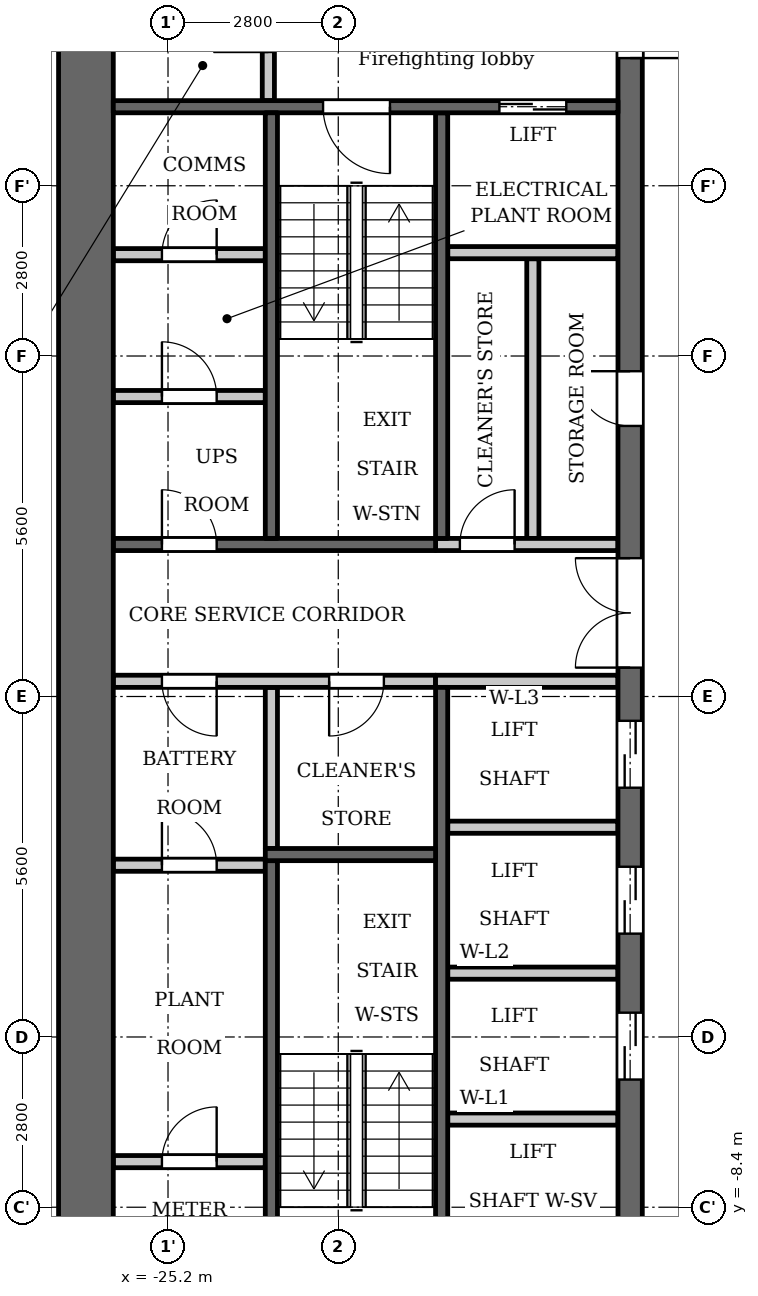
"""IFC4 building model, lengths in metres.
Left out: names, types, materials, properties, quantities, classifications, styles, units other than length and angle.
Written with IfcOpenShell. Run it as: python <this file> out.ifc"""

import sys

from ifc_helpers import new_model, si_unit, direction, frame, frame_2d, origin, place, context, subcontext, project, spatial, rectangle, extrude, element, fill, save


model = new_model("IFC4")
c1 = context("Model", 3, precision=1e-05, world=origin(), true_north=direction((0.0, 1.0)))
c2 = subcontext(c1, "Body", "Model", "MODEL_VIEW")
j1 = project(units=[si_unit("LENGTHUNIT", "METRE"), si_unit("PLANEANGLEUNIT", "RADIAN")], contexts=[c1])
p1 = place(None, origin())
s1 = spatial("IfcSite", under=j1, at=p1, CompositionType="ELEMENT")
p2 = place(p1, origin())
s2 = spatial("IfcBuilding", under=s1, at=p2, CompositionType="ELEMENT")
p3 = place(p2, frame((0.0, 0.0, 83.3)))
s3 = spatial("IfcBuildingStorey", under=s2, at=p3, CompositionType="ELEMENT", Elevation=83.3)
p4 = place(p3, frame((-23.5, -2.5, 0.0), z_axis=(0.0, 0.0, 1.0), x_axis=(0.0, 1.0, 0.0)))
e1 = element("IfcWall", 1, at=p4, inside=s3, PredefinedType="PARTITIONING", context=c2, shape_type="SweptSolid", body=[
    extrude(rectangle(XDim=2.65, YDim=0.2, at=frame_2d((1.325, 0.0))), origin(), (0.0, 0.0, 1.0), 3.2),
])
p5 = place(p3, frame((-20.7, 2.6, 0.0), z_axis=(0.0, 0.0, 1.0), x_axis=(0.0, 1.0, 0.0)))
e2 = element("IfcWall", 2, at=p5, inside=s3, PredefinedType="SHEAR", context=c2, shape_type="SweptSolid", body=[
    extrude(rectangle(XDim=7.0, YDim=0.2, at=frame_2d((3.5, 0.0))), origin(), (0.0, 0.0, 1.0), 3.2),
])
p6 = place(p3, frame((-20.7, -9.6, 0.0), z_axis=(0.0, 0.0, 1.0), x_axis=(0.0, 1.0, 0.0)))
e3 = element("IfcWall", 3, at=p6, inside=s3, PredefinedType="SHEAR", context=c2, shape_type="SweptSolid", body=[
    extrude(rectangle(XDim=9.75, YDim=0.2, at=frame_2d((4.875, 0.0))), origin(), (0.0, 0.0, 1.0), 3.2),
])
p7 = place(p3, frame((-20.8, 2.5, 0.0), z_axis=(0.0, 0.0, 1.0), x_axis=(-1.0, 0.0, 0.0)))
e4 = element("IfcWall", 4, at=p7, inside=s3, PredefinedType="SHEAR", context=c2, shape_type="SweptSolid", body=[
    extrude(rectangle(XDim=5.3, YDim=0.2, at=frame_2d((2.65, 0.0))), origin(), (0.0, 0.0, 1.0), 3.2),
])
p8 = place(p7, frame((3.6, 0.0, 0.0)))
e5 = element("IfcOpeningElement", 5, at=p8, cuts=e4, PredefinedType="OPENING", context=c2, shape_type="SweptSolid", body=[
    extrude(rectangle(XDim=0.9, YDim=2.1, at=frame_2d((0.45, 1.05))), frame((0.0, 0.11, 0.0), z_axis=(0.0, -1.0, 0.0), x_axis=(1.0, 0.0, 0.0)), (0.0, 0.0, 1.0), 0.22),
])
p9 = place(p3, frame((-20.8, 0.25, 0.0), z_axis=(0.0, 0.0, 1.0), x_axis=(-1.0, 0.0, 0.0)))
e6 = element("IfcWall", 6, at=p9, inside=s3, PredefinedType="PARTITIONING", context=c2, shape_type="SweptSolid", body=[
    extrude(rectangle(XDim=5.3, YDim=0.2, at=frame_2d((2.65, 0.0))), origin(), (0.0, 0.0, 1.0), 3.2),
])
p10 = place(p9, frame((0.85, 0.0, 0.0)))
e7 = element("IfcOpeningElement", 7, at=p10, cuts=e6, PredefinedType="OPENING", context=c2, shape_type="SweptSolid", body=[
    extrude(rectangle(XDim=0.9, YDim=2.1, at=frame_2d((0.45, 1.05))), frame((0.0, 0.11, 0.0), z_axis=(0.0, -1.0, 0.0), x_axis=(1.0, 0.0, 0.0)), (0.0, 0.0, 1.0), 0.22),
])
p11 = place(p9, frame((3.6, 0.0, 0.0)))
e8 = element("IfcOpeningElement", 8, at=p11, cuts=e6, PredefinedType="OPENING", context=c2, shape_type="SweptSolid", body=[
    extrude(rectangle(XDim=0.9, YDim=2.1, at=frame_2d((0.45, 1.05))), frame((0.0, 0.11, 0.0), z_axis=(0.0, -1.0, 0.0), x_axis=(1.0, 0.0, 0.0)), (0.0, 0.0, 1.0), 0.22),
])
p12 = place(p3, frame((-19.2, 2.6, 0.0), z_axis=(0.0, 0.0, 1.0), x_axis=(0.0, 1.0, 0.0)))
e9 = element("IfcWall", 9, at=p12, inside=s3, PredefinedType="PARTITIONING", context=c2, shape_type="SweptSolid", body=[
    extrude(rectangle(XDim=4.6, YDim=0.2, at=frame_2d((2.3, 0.0))), origin(), (0.0, 0.0, 1.0), 3.2),
])
p13 = place(p3, frame((-17.6, -12.3, 0.0), z_axis=(0.0, 0.0, 1.0), x_axis=(0.0, 1.0, 0.0)))
e10 = element("IfcWall", 10, at=p13, inside=s3, PredefinedType="SHEAR", context=c2, shape_type="SweptSolid", body=[
    extrude(rectangle(XDim=24.6, YDim=0.4, at=frame_2d((12.3, 0.0))), origin(), (0.0, 0.0, 1.0), 3.2),
])
p14 = place(p13, frame((6.0, 0.0, 0.0)))
e11 = element("IfcOpeningElement", 11, at=p14, cuts=e10, PredefinedType="OPENING", context=c2, shape_type="SweptSolid", body=[
    extrude(rectangle(XDim=1.1, YDim=2.1, at=frame_2d((0.55, 1.05))), frame((0.0, 0.21, 0.0), z_axis=(0.0, -1.0, 0.0), x_axis=(1.0, 0.0, 0.0)), (0.0, 0.0, 1.0), 0.42),
])
p15 = place(p13, frame((8.4, 0.0, 0.0)))
e12 = element("IfcOpeningElement", 12, at=p15, cuts=e10, PredefinedType="OPENING", context=c2, shape_type="SweptSolid", body=[
    extrude(rectangle(XDim=1.1, YDim=2.1, at=frame_2d((0.55, 1.05))), frame((0.0, 0.21, 0.0), z_axis=(0.0, -1.0, 0.0), x_axis=(1.0, 0.0, 0.0)), (0.0, 0.0, 1.0), 0.42),
])
p16 = place(p13, frame((10.8, 0.0, 0.0)))
e13 = element("IfcOpeningElement", 13, at=p16, cuts=e10, PredefinedType="OPENING", context=c2, shape_type="SweptSolid", body=[
    extrude(rectangle(XDim=1.1, YDim=2.1, at=frame_2d((0.55, 1.05))), frame((0.0, 0.21, 0.0), z_axis=(0.0, -1.0, 0.0), x_axis=(1.0, 0.0, 0.0)), (0.0, 0.0, 1.0), 0.42),
])
p17 = place(p13, frame((16.75, 0.0, 0.0)))
e14 = element("IfcOpeningElement", 14, at=p17, cuts=e10, PredefinedType="OPENING", context=c2, shape_type="SweptSolid", body=[
    extrude(rectangle(XDim=0.9, YDim=2.1, at=frame_2d((0.45, 1.05))), frame((0.0, 0.21, 0.0), z_axis=(0.0, -1.0, 0.0), x_axis=(1.0, 0.0, 0.0)), (0.0, 0.0, 1.0), 0.42),
])
p18 = place(p13, frame((22.8, 0.0, 0.0)))
e15 = element("IfcOpeningElement", 15, at=p18, cuts=e10, PredefinedType="OPENING", context=c2, shape_type="SweptSolid", body=[
    extrude(rectangle(XDim=1.1, YDim=2.1, at=frame_2d((0.55, 1.05))), frame((0.0, 0.21, 0.0), z_axis=(0.0, -1.0, 0.0), x_axis=(1.0, 0.0, 0.0)), (0.0, 0.0, 1.0), 0.42),
])
p19 = place(p13, frame((0.7, 0.0, 0.0)))
e16 = element("IfcOpeningElement", 16, at=p19, cuts=e10, PredefinedType="OPENING", context=c2, shape_type="SweptSolid", body=[
    extrude(rectangle(XDim=1.1, YDim=2.1, at=frame_2d((0.55, 1.05))), frame((0.0, 0.21, 0.0), z_axis=(0.0, -1.0, 0.0), x_axis=(1.0, 0.0, 0.0)), (0.0, 0.0, 1.0), 0.42),
])
p20 = place(p13, frame((12.775, 0.0, 0.0)))
e17 = element("IfcOpeningElement", 17, at=p20, cuts=e10, PredefinedType="OPENING", context=c2, shape_type="SweptSolid", body=[
    extrude(rectangle(XDim=1.8, YDim=2.1, at=frame_2d((0.9, 1.05))), frame((0.0, 0.21, 0.0), z_axis=(0.0, -1.0, 0.0), x_axis=(1.0, 0.0, 0.0)), (0.0, 0.0, 1.0), 0.42),
])
p21 = place(p3, frame((-26.55, -12.3, 0.0), z_axis=(0.0, 0.0, 1.0), x_axis=(0.0, 1.0, 0.0)))
e18 = element("IfcWall", 18, at=p21, inside=s3, PredefinedType="SHEAR", context=c2, shape_type="SweptSolid", body=[
    extrude(rectangle(XDim=24.6, YDim=0.9, at=frame_2d((12.3, 0.0))), origin(), (0.0, 0.0, 1.0), 3.2),
])
p22 = place(p3, frame((-23.55, 9.8, 0.0), z_axis=(0.0, 0.0, 1.0), x_axis=(0.0, 1.0, 0.0)))
e19 = element("IfcWall", 19, at=p22, inside=s3, PredefinedType="PARTITIONING", context=c2, shape_type="SweptSolid", body=[
    extrude(rectangle(XDim=2.5, YDim=0.2, at=frame_2d((1.25, 0.0))), origin(), (0.0, 0.0, 1.0), 3.2),
])
p23 = place(p22, frame((0.8, 0.0, 0.0)))
e20 = element("IfcOpeningElement", 20, at=p23, cuts=e19, PredefinedType="OPENING", context=c2, shape_type="SweptSolid", body=[
    extrude(rectangle(XDim=0.9, YDim=2.1, at=frame_2d((0.45, 1.05))), frame((0.0, 0.11, 0.0), z_axis=(0.0, -1.0, 0.0), x_axis=(1.0, 0.0, 0.0)), (0.0, 0.0, 1.0), 0.22),
])
p24 = place(p3, frame((-23.6, -7.65, 0.0), z_axis=(0.0, 0.0, 1.0), x_axis=(-1.0, 0.0, 0.0)))
e21 = element("IfcWall", 21, at=p24, inside=s3, PredefinedType="PARTITIONING", context=c2, shape_type="SweptSolid", body=[
    extrude(rectangle(XDim=2.5, YDim=0.2, at=frame_2d((1.25, 0.0))), origin(), (0.0, 0.0, 1.0), 3.2),
])
p25 = place(p24, frame((0.8, 0.0, 0.0)))
e22 = element("IfcOpeningElement", 22, at=p25, cuts=e21, PredefinedType="OPENING", context=c2, shape_type="SweptSolid", body=[
    extrude(rectangle(XDim=0.9, YDim=2.1, at=frame_2d((0.45, 1.05))), frame((0.0, 0.11, 0.0), z_axis=(0.0, -1.0, 0.0), x_axis=(1.0, 0.0, 0.0)), (0.0, 0.0, 1.0), 0.22),
])
p26 = place(p3, frame((-23.6, -2.775, 0.0), z_axis=(0.0, 0.0, 1.0), x_axis=(-1.0, 0.0, 0.0)))
e23 = element("IfcWall", 23, at=p26, inside=s3, PredefinedType="PARTITIONING", context=c2, shape_type="SweptSolid", body=[
    extrude(rectangle(XDim=2.5, YDim=0.2, at=frame_2d((1.25, 0.0))), origin(), (0.0, 0.0, 1.0), 3.2),
])
p27 = place(p26, frame((0.8, 0.0, 0.0)))
e24 = element("IfcOpeningElement", 24, at=p27, cuts=e23, PredefinedType="OPENING", context=c2, shape_type="SweptSolid", body=[
    extrude(rectangle(XDim=0.9, YDim=2.1, at=frame_2d((0.45, 1.05))), frame((0.0, 0.11, 0.0), z_axis=(0.0, -1.0, 0.0), x_axis=(1.0, 0.0, 0.0)), (0.0, 0.0, 1.0), 0.22),
])
p28 = place(p3, frame((-23.6, 4.933, 0.0), z_axis=(0.0, 0.0, 1.0), x_axis=(-1.0, 0.0, 0.0)))
e25 = element("IfcWall", 25, at=p28, inside=s3, PredefinedType="PARTITIONING", context=c2, shape_type="SweptSolid", body=[
    extrude(rectangle(XDim=2.5, YDim=0.2, at=frame_2d((1.25, 0.0))), origin(), (0.0, 0.0, 1.0), 3.2),
])
p29 = place(p28, frame((0.8, 0.0, 0.0)))
e26 = element("IfcOpeningElement", 26, at=p29, cuts=e25, PredefinedType="OPENING", context=c2, shape_type="SweptSolid", body=[
    extrude(rectangle(XDim=0.9, YDim=2.1, at=frame_2d((0.45, 1.05))), frame((0.0, 0.11, 0.0), z_axis=(0.0, -1.0, 0.0), x_axis=(1.0, 0.0, 0.0)), (0.0, 0.0, 1.0), 0.22),
])
p30 = place(p3, frame((-23.6, 7.267, 0.0), z_axis=(0.0, 0.0, 1.0), x_axis=(-1.0, 0.0, 0.0)))
e27 = element("IfcWall", 27, at=p30, inside=s3, PredefinedType="PARTITIONING", context=c2, shape_type="SweptSolid", body=[
    extrude(rectangle(XDim=2.5, YDim=0.2, at=frame_2d((1.25, 0.0))), origin(), (0.0, 0.0, 1.0), 3.2),
])
p31 = place(p30, frame((0.8, 0.0, 0.0)))
e28 = element("IfcOpeningElement", 28, at=p31, cuts=e27, PredefinedType="OPENING", context=c2, shape_type="SweptSolid", body=[
    extrude(rectangle(XDim=0.9, YDim=2.1, at=frame_2d((0.45, 1.05))), frame((0.0, 0.11, 0.0), z_axis=(0.0, -1.0, 0.0), x_axis=(1.0, 0.0, 0.0)), (0.0, 0.0, 1.0), 0.22),
])
for number, where, z_axis, x_axis in (
    (29, (-17.8, -6.95, 0.0), (0.0, 0.0, 1.0), (-1.0, 0.0, 0.0)),
    (30, (-17.8, -4.55, 0.0), (0.0, 0.0, 1.0), (-1.0, 0.0, 0.0)),
    (31, (-17.8, -2.15, 0.0), (0.0, 0.0, 1.0), (-1.0, 0.0, 0.0)),
):
    element("IfcWall", number, at=place(p3, frame(where, z_axis=z_axis, x_axis=x_axis)), inside=s3, PredefinedType="PARTITIONING", context=c2, shape_type="SweptSolid", body=[
        extrude(rectangle(XDim=2.8, YDim=0.2, at=frame_2d((1.4, 0.0))), origin(), (0.0, 0.0, 1.0), 3.2),
    ])
p32 = place(p3, frame((-17.8, 0.25, 0.0), z_axis=(0.0, 0.0, 1.0), x_axis=(-1.0, 0.0, 0.0)))
e32 = element("IfcWall", 32, at=p32, inside=s3, PredefinedType="PARTITIONING", context=c2, shape_type="SweptSolid", body=[
    extrude(rectangle(XDim=3.0, YDim=0.2, at=frame_2d((1.5, 0.0))), origin(), (0.0, 0.0, 1.0), 3.2),
])
p33 = place(p3, frame((-17.8, 2.5, 0.0), z_axis=(0.0, 0.0, 1.0), x_axis=(-1.0, 0.0, 0.0)))
e33 = element("IfcWall", 33, at=p33, inside=s3, PredefinedType="PARTITIONING", context=c2, shape_type="SweptSolid", body=[
    extrude(rectangle(XDim=3.0, YDim=0.2, at=frame_2d((1.5, 0.0))), origin(), (0.0, 0.0, 1.0), 3.2),
])
p34 = place(p33, frame((1.7, 0.0, 0.0)))
e34 = element("IfcOpeningElement", 34, at=p34, cuts=e33, PredefinedType="OPENING", context=c2, shape_type="SweptSolid", body=[
    extrude(rectangle(XDim=0.9, YDim=2.1, at=frame_2d((0.45, 1.05))), frame((0.0, 0.11, 0.0), z_axis=(0.0, -1.0, 0.0), x_axis=(1.0, 0.0, 0.0)), (0.0, 0.0, 1.0), 0.22),
])
p35 = place(p3, frame((-17.8, 7.3, 0.0), z_axis=(0.0, 0.0, 1.0), x_axis=(-1.0, 0.0, 0.0)))
e35 = element("IfcWall", 35, at=p35, inside=s3, PredefinedType="PARTITIONING", context=c2, shape_type="SweptSolid", body=[
    extrude(rectangle(XDim=2.8, YDim=0.2, at=frame_2d((1.4, 0.0))), origin(), (0.0, 0.0, 1.0), 3.2),
])
p36 = place(p3, frame((-17.8, 9.7, 0.0), z_axis=(0.0, 0.0, 1.0), x_axis=(-1.0, 0.0, 0.0)))
e36 = element("IfcWall", 36, at=p36, inside=s3, PredefinedType="SHEAR", context=c2, shape_type="SweptSolid", body=[
    extrude(rectangle(XDim=8.3, YDim=0.2, at=frame_2d((4.15, 0.0))), origin(), (0.0, 0.0, 1.0), 3.2),
])
p37 = place(p36, frame((0.85, 0.0, 0.0)))
e37 = element("IfcOpeningElement", 37, at=p37, cuts=e36, PredefinedType="OPENING", context=c2, shape_type="SweptSolid", body=[
    extrude(rectangle(XDim=1.1, YDim=2.1, at=frame_2d((0.55, 1.05))), frame((0.0, 0.11, 0.0), z_axis=(0.0, -1.0, 0.0), x_axis=(1.0, 0.0, 0.0)), (0.0, 0.0, 1.0), 0.22),
])
p38 = place(p36, frame((3.75, 0.0, 0.0)))
e38 = element("IfcOpeningElement", 38, at=p38, cuts=e36, PredefinedType="OPENING", context=c2, shape_type="SweptSolid", body=[
    extrude(rectangle(XDim=1.1, YDim=2.1, at=frame_2d((0.55, 1.05))), frame((0.0, 0.11, 0.0), z_axis=(0.0, -1.0, 0.0), x_axis=(1.0, 0.0, 0.0)), (0.0, 0.0, 1.0), 0.22),
])
p39 = place(p3, frame((-23.5, 2.6, 0.0), z_axis=(0.0, 0.0, 1.0), x_axis=(0.0, 1.0, 0.0)))
e39 = element("IfcWall", 39, at=p39, inside=s3, PredefinedType="SHEAR", context=c2, shape_type="SweptSolid", body=[
    extrude(rectangle(XDim=7.0, YDim=0.2, at=frame_2d((3.5, 0.0))), origin(), (0.0, 0.0, 1.0), 3.2),
])
p40 = place(p3, frame((-23.5, -9.6, 0.0), z_axis=(0.0, 0.0, 1.0), x_axis=(0.0, 1.0, 0.0)))
e40 = element("IfcWall", 40, at=p40, inside=s3, PredefinedType="SHEAR", context=c2, shape_type="SweptSolid", body=[
    extrude(rectangle(XDim=6.9, YDim=0.2, at=frame_2d((3.45, 0.0))), origin(), (0.0, 0.0, 1.0), 3.2),
])
p41 = place(p3, frame((-20.8, -2.6, 0.0), z_axis=(0.0, 0.0, 1.0), x_axis=(-1.0, 0.0, 0.0)))
e41 = element("IfcWall", 41, at=p41, inside=s3, PredefinedType="SHEAR", context=c2, shape_type="SweptSolid", body=[
    extrude(rectangle(XDim=2.8, YDim=0.2, at=frame_2d((1.4, 0.0))), origin(), (0.0, 0.0, 1.0), 3.2),
])
p42 = place(p14, origin())
e42 = element("IfcDoor", 42, at=p42, inside=s3, OperationType="DOUBLE_DOOR_SLIDING", PredefinedType="DOOR", context=c2, shape_type="SweptSolid", body=[
    extrude(rectangle(XDim=1.1, YDim=2.1, at=frame_2d((0.55, 1.05))), frame((0.0, 0.025, 0.0), z_axis=(0.0, -1.0, 0.0), x_axis=(1.0, 0.0, 0.0)), (0.0, 0.0, 1.0), 0.05),
])
fill(e11, e42)
p43 = place(p15, origin())
e43 = element("IfcDoor", 43, at=p43, inside=s3, OperationType="DOUBLE_DOOR_SLIDING", PredefinedType="DOOR", context=c2, shape_type="SweptSolid", body=[
    extrude(rectangle(XDim=1.1, YDim=2.1, at=frame_2d((0.55, 1.05))), frame((0.0, 0.025, 0.0), z_axis=(0.0, -1.0, 0.0), x_axis=(1.0, 0.0, 0.0)), (0.0, 0.0, 1.0), 0.05),
])
fill(e12, e43)
p44 = place(p16, origin())
e44 = element("IfcDoor", 44, at=p44, inside=s3, OperationType="DOUBLE_DOOR_SLIDING", PredefinedType="DOOR", context=c2, shape_type="SweptSolid", body=[
    extrude(rectangle(XDim=1.1, YDim=2.1, at=frame_2d((0.55, 1.05))), frame((0.0, 0.025, 0.0), z_axis=(0.0, -1.0, 0.0), x_axis=(1.0, 0.0, 0.0)), (0.0, 0.0, 1.0), 0.05),
])
fill(e13, e44)
p45 = place(p17, origin())
e45 = element("IfcDoor", 45, at=p45, inside=s3, OperationType="SINGLE_SWING_LEFT", PredefinedType="DOOR", context=c2, shape_type="SweptSolid", body=[
    extrude(rectangle(XDim=0.9, YDim=2.1, at=frame_2d((0.45, 1.05))), frame((0.0, 0.025, 0.0), z_axis=(0.0, -1.0, 0.0), x_axis=(1.0, 0.0, 0.0)), (0.0, 0.0, 1.0), 0.05),
])
fill(e14, e45)
p46 = place(p34, origin())
e46 = element("IfcDoor", 46, at=p46, inside=s3, OperationType="SINGLE_SWING_LEFT", PredefinedType="DOOR", context=c2, shape_type="SweptSolid", body=[
    extrude(rectangle(XDim=0.9, YDim=2.1, at=frame_2d((0.45, 1.05))), frame((0.0, 0.025, 0.0), z_axis=(0.0, -1.0, 0.0), x_axis=(1.0, 0.0, 0.0)), (0.0, 0.0, 1.0), 0.05),
])
fill(e34, e46)
p47 = place(p37, origin())
e47 = element("IfcDoor", 47, at=p47, inside=s3, OperationType="DOUBLE_DOOR_SLIDING", PredefinedType="DOOR", context=c2, shape_type="SweptSolid", body=[
    extrude(rectangle(XDim=1.1, YDim=2.1, at=frame_2d((0.55, 1.05))), frame((0.0, 0.025, 0.0), z_axis=(0.0, -1.0, 0.0), x_axis=(1.0, 0.0, 0.0)), (0.0, 0.0, 1.0), 0.05),
])
fill(e37, e47)
p48 = place(p18, origin())
e48 = element("IfcDoor", 48, at=p48, inside=s3, OperationType="SINGLE_SWING_LEFT", PredefinedType="DOOR", context=c2, shape_type="SweptSolid", body=[
    extrude(rectangle(XDim=1.1, YDim=2.1, at=frame_2d((0.55, 1.05))), frame((0.0, 0.025, 0.0), z_axis=(0.0, -1.0, 0.0), x_axis=(1.0, 0.0, 0.0)), (0.0, 0.0, 1.0), 0.05),
])
fill(e15, e48)
p49 = place(p38, origin())
e49 = element("IfcDoor", 49, at=p49, inside=s3, OperationType="SINGLE_SWING_RIGHT", PredefinedType="DOOR", context=c2, shape_type="SweptSolid", body=[
    extrude(rectangle(XDim=1.1, YDim=2.1, at=frame_2d((0.55, 1.05))), frame((0.0, 0.025, 0.0), z_axis=(0.0, -1.0, 0.0), x_axis=(1.0, 0.0, 0.0)), (0.0, 0.0, 1.0), 0.05),
])
fill(e38, e49)
p50 = place(p20, origin())
e50 = element("IfcDoor", 50, at=p50, inside=s3, OperationType="DOUBLE_DOOR_SINGLE_SWING", PredefinedType="DOOR", context=c2, shape_type="SweptSolid", body=[
    extrude(rectangle(XDim=1.8, YDim=2.1, at=frame_2d((0.9, 1.05))), frame((0.0, 0.025, 0.0), z_axis=(0.0, -1.0, 0.0), x_axis=(1.0, 0.0, 0.0)), (0.0, 0.0, 1.0), 0.05),
])
fill(e17, e50)
p51 = place(p10, origin())
e51 = element("IfcDoor", 51, at=p51, inside=s3, OperationType="SINGLE_SWING_LEFT", PredefinedType="DOOR", context=c2, shape_type="SweptSolid", body=[
    extrude(rectangle(XDim=0.9, YDim=2.1, at=frame_2d((0.45, 1.05))), frame((0.0, 0.025, 0.0), z_axis=(0.0, -1.0, 0.0), x_axis=(1.0, 0.0, 0.0)), (0.0, 0.0, 1.0), 0.05),
])
fill(e7, e51)
p52 = place(p25, origin())
e52 = element("IfcDoor", 52, at=p52, inside=s3, OperationType="SINGLE_SWING_LEFT", PredefinedType="DOOR", context=c2, shape_type="SweptSolid", body=[
    extrude(rectangle(XDim=0.9, YDim=2.1, at=frame_2d((0.45, 1.05))), frame((0.0, 0.025, 0.0), z_axis=(0.0, -1.0, 0.0), x_axis=(1.0, 0.0, 0.0)), (0.0, 0.0, 1.0), 0.05),
])
fill(e22, e52)
p53 = place(p27, origin())
e53 = element("IfcDoor", 53, at=p53, inside=s3, OperationType="SINGLE_SWING_RIGHT", PredefinedType="DOOR", context=c2, shape_type="SweptSolid", body=[
    extrude(rectangle(XDim=0.9, YDim=2.1, at=frame_2d((0.45, 1.05))), frame((0.0, 0.025, 0.0), z_axis=(0.0, -1.0, 0.0), x_axis=(1.0, 0.0, 0.0)), (0.0, 0.0, 1.0), 0.05),
])
fill(e24, e53)
p54 = place(p11, origin())
e54 = element("IfcDoor", 54, at=p54, inside=s3, OperationType="SINGLE_SWING_RIGHT", PredefinedType="DOOR", context=c2, shape_type="SweptSolid", body=[
    extrude(rectangle(XDim=0.9, YDim=2.1, at=frame_2d((0.45, 1.05))), frame((0.0, 0.025, 0.0), z_axis=(0.0, -1.0, 0.0), x_axis=(1.0, 0.0, 0.0)), (0.0, 0.0, 1.0), 0.05),
])
fill(e8, e54)
p55 = place(p29, origin())
e55 = element("IfcDoor", 55, at=p55, inside=s3, OperationType="SINGLE_SWING_RIGHT", PredefinedType="DOOR", context=c2, shape_type="SweptSolid", body=[
    extrude(rectangle(XDim=0.9, YDim=2.1, at=frame_2d((0.45, 1.05))), frame((0.0, 0.025, 0.0), z_axis=(0.0, -1.0, 0.0), x_axis=(1.0, 0.0, 0.0)), (0.0, 0.0, 1.0), 0.05),
])
fill(e26, e55)
p56 = place(p31, origin())
e56 = element("IfcDoor", 56, at=p56, inside=s3, OperationType="SINGLE_SWING_LEFT", PredefinedType="DOOR", context=c2, shape_type="SweptSolid", body=[
    extrude(rectangle(XDim=0.9, YDim=2.1, at=frame_2d((0.45, 1.05))), frame((0.0, 0.025, 0.0), z_axis=(0.0, -1.0, 0.0), x_axis=(1.0, 0.0, 0.0)), (0.0, 0.0, 1.0), 0.05),
])
fill(e28, e56)
p57 = place(p8, origin())
e57 = element("IfcDoor", 57, at=p57, inside=s3, OperationType="SINGLE_SWING_RIGHT", PredefinedType="DOOR", context=c2, shape_type="SweptSolid", body=[
    extrude(rectangle(XDim=0.9, YDim=2.1, at=frame_2d((0.45, 1.05))), frame((0.0, 0.025, 0.0), z_axis=(0.0, -1.0, 0.0), x_axis=(1.0, 0.0, 0.0)), (0.0, 0.0, 1.0), 0.05),
])
fill(e5, e57)
save(model, sys.argv[1])
